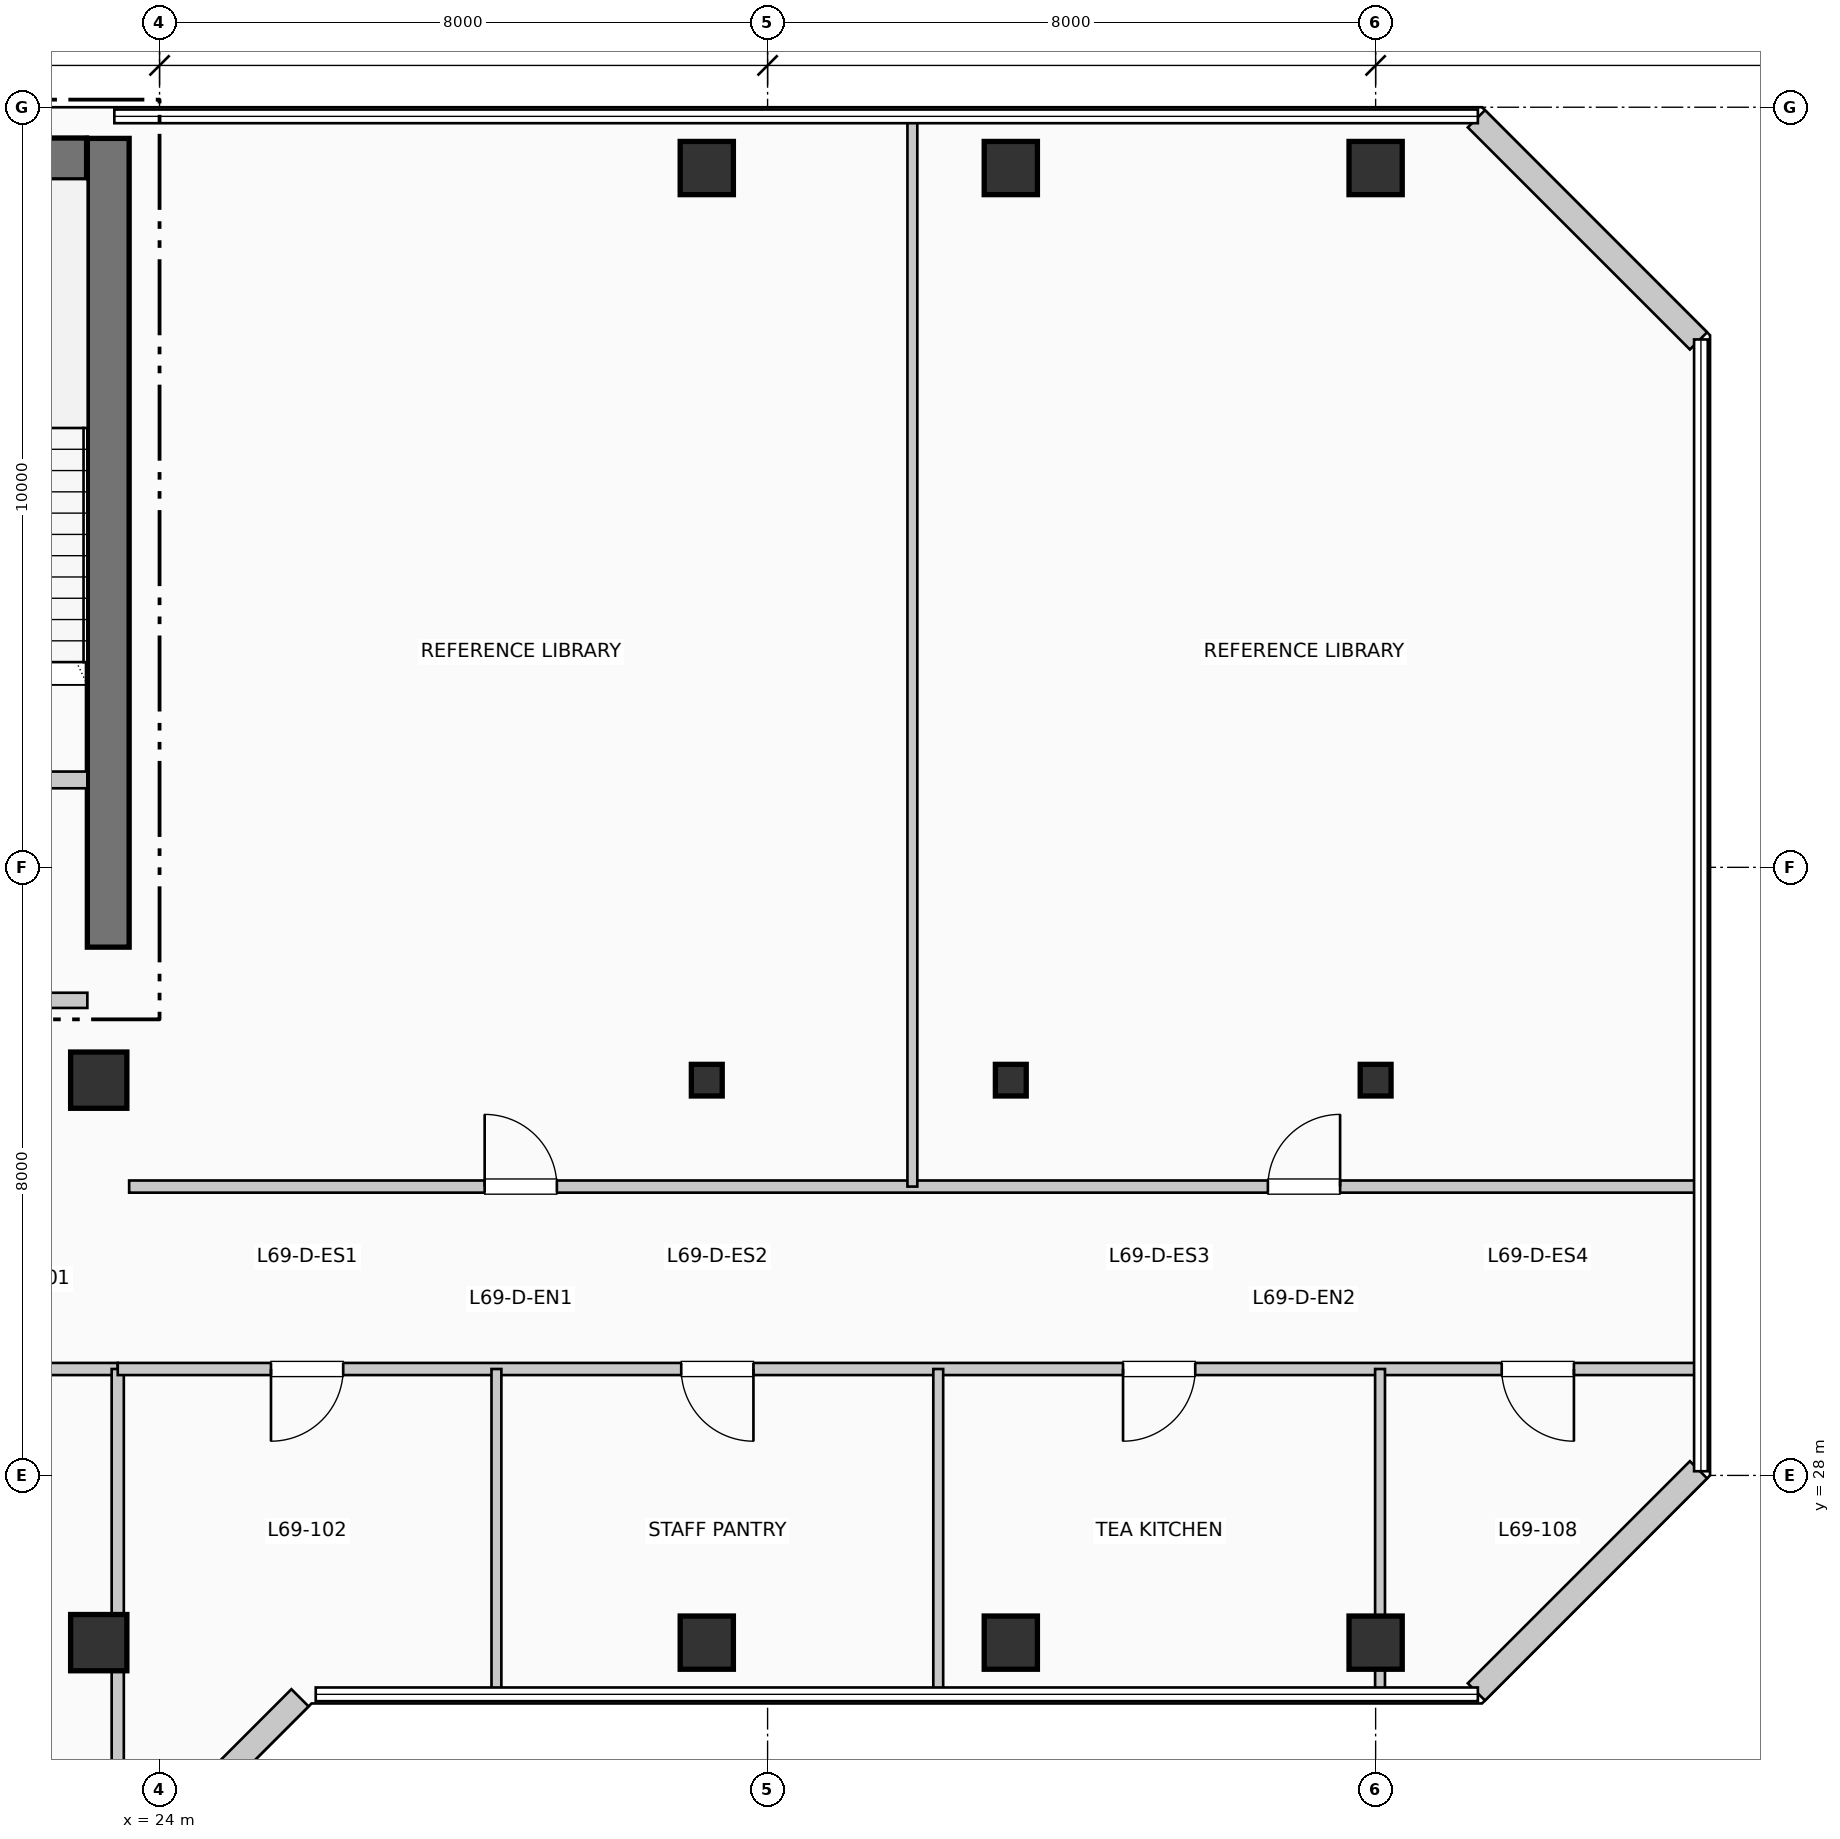
"""IFC4 building model, lengths in metres.
Left out: names, types, materials, properties, quantities, classifications, styles, units other than length and angle.
Written with IfcOpenShell. Run it as: python <this file> out.ifc"""

import sys

from ifc_helpers import new_model, si_unit, direction, frame, frame_2d, origin, origin_2d, place, context, subcontext, project, spatial, rectangle, i_section, extrude, element, fill, save


model = new_model("IFC4")
c1 = context("Model", 3, precision=1e-05, world=origin(), true_north=direction((0.0, 1.0)))
c2 = subcontext(c1, "Body", "Model", "MODEL_VIEW")
j1 = project(units=[si_unit("LENGTHUNIT", "METRE"), si_unit("PLANEANGLEUNIT", "RADIAN")], contexts=[c1])
p1 = place(None, origin())
s1 = spatial("IfcSite", under=j1, at=p1, CompositionType="ELEMENT")
p2 = place(p1, origin())
s2 = spatial("IfcBuilding", under=s1, at=p2, CompositionType="ELEMENT")
p3 = place(p2, frame((0.0, 0.0, 284.13)))
s3 = spatial("IfcBuildingStorey", under=s2, at=p3, CompositionType="ELEMENT", Elevation=284.13)
p4 = place(p3, frame((23.325, 34.95, 0.0), z_axis=(0.0, 0.0, 1.0), x_axis=(0.0, 1.0, 0.0)))
e1 = element("IfcWall", 1, at=p4, inside=s3, PredefinedType="SHEAR", context=c2, shape_type="SweptSolid", body=[
    extrude(rectangle(XDim=10.64, YDim=0.55, at=frame_2d((5.32, 0.0))), origin(), (0.0, 0.0, 1.0), 3.96),
])
p5 = place(p3, frame((19.35, 45.32, 0.0), z_axis=(0.0, 0.0, 1.0), x_axis=(1.0, 0.0, 0.0)))
e2 = element("IfcWall", 2, at=p5, inside=s3, PredefinedType="SHEAR", context=c2, shape_type="SweptSolid", body=[
    extrude(rectangle(XDim=3.69, YDim=0.55, at=frame_2d((1.845, 0.0))), origin(), (0.0, 0.0, 1.0), 3.96),
])
p6 = place(p5, frame((1.15, 0.0, 1.05)))
e3 = element("IfcOpeningElement", 3, at=p6, cuts=e2, PredefinedType="OPENING", context=c2, shape_type="SweptSolid", body=[
    extrude(rectangle(XDim=1.4, YDim=1.8, at=frame_2d((0.7, 0.9))), frame((0.0, 0.285, 0.0), z_axis=(0.0, -1.0, 0.0), x_axis=(1.0, 0.0, 0.0)), (0.0, 0.0, 1.0), 0.57),
])
for number, where, z_axis, x_axis in (
    (4, (23.2, 25.8, 0.0), (0.0, 0.0, 1.0), (1.0, 0.0, 0.0)),
    (5, (23.2, 33.2, 0.0), (0.0, 0.0, 1.0), (1.0, 0.0, 0.0)),
):
    element("IfcColumn", number, at=place(p3, frame(where, z_axis=z_axis, x_axis=x_axis)), inside=s3, PredefinedType="COLUMN", context=c2, shape_type="SweptSolid", body=[
        extrude(rectangle(XDim=0.74, YDim=0.74, at=origin_2d()), origin(), (0.0, 0.0, 1.0), 3.96),
    ])
p7 = place(p3, frame((31.2, 25.8, 0.0), z_axis=(0.0, 0.0, 1.0), x_axis=(1.0, 0.0, 0.0)))
e6 = element("IfcColumn", 6, at=p7, inside=s3, PredefinedType="COLUMN", context=c2, shape_type="SweptSolid", body=[
    extrude(rectangle(XDim=0.7, YDim=0.7, at=origin_2d()), origin(), (0.0, 0.0, 1.0), 3.96),
])
p8 = place(p3, frame((31.2, 33.2, 0.0), z_axis=(0.0, 0.0, 1.0), x_axis=(1.0, 0.0, 0.0)))
e7 = element("IfcColumn", 7, at=p8, inside=s3, PredefinedType="COLUMN", context=c2, shape_type="SweptSolid", body=[
    extrude(i_section(OverallWidth=0.406, OverallDepth=0.416, WebThickness=0.022, FlangeThickness=0.036, at=origin_2d()), origin(), (0.0, 0.0, 1.0), 3.96),
])
for number, where, z_axis, x_axis in (
    (8, (31.2, 45.2, 0.0), (0.0, 0.0, 1.0), (1.0, 0.0, 0.0)),
    (9, (35.2, 25.8, 0.0), (0.0, 0.0, 1.0), (1.0, 0.0, 0.0)),
):
    element("IfcColumn", number, at=place(p3, frame(where, z_axis=z_axis, x_axis=x_axis)), inside=s3, PredefinedType="COLUMN", context=c2, shape_type="SweptSolid", body=[
        extrude(rectangle(XDim=0.7, YDim=0.7, at=origin_2d()), origin(), (0.0, 0.0, 1.0), 3.96),
    ])
p9 = place(p3, frame((35.2, 33.2, 0.0), z_axis=(0.0, 0.0, 1.0), x_axis=(1.0, 0.0, 0.0)))
e10 = element("IfcColumn", 10, at=p9, inside=s3, PredefinedType="COLUMN", context=c2, shape_type="SweptSolid", body=[
    extrude(i_section(OverallWidth=0.406, OverallDepth=0.416, WebThickness=0.022, FlangeThickness=0.036, at=origin_2d()), origin(), (0.0, 0.0, 1.0), 3.96),
])
for number, where, z_axis, x_axis in (
    (11, (35.2, 45.2, 0.0), (0.0, 0.0, 1.0), (1.0, 0.0, 0.0)),
    (12, (40.0, 25.8, 0.0), (0.0, 0.0, 1.0), (1.0, 0.0, 0.0)),
):
    element("IfcColumn", number, at=place(p3, frame(where, z_axis=z_axis, x_axis=x_axis)), inside=s3, PredefinedType="COLUMN", context=c2, shape_type="SweptSolid", body=[
        extrude(rectangle(XDim=0.7, YDim=0.7, at=origin_2d()), origin(), (0.0, 0.0, 1.0), 3.96),
    ])
p10 = place(p3, frame((40.0, 33.2, 0.0), z_axis=(0.0, 0.0, 1.0), x_axis=(1.0, 0.0, 0.0)))
e13 = element("IfcColumn", 13, at=p10, inside=s3, PredefinedType="COLUMN", context=c2, shape_type="SweptSolid", body=[
    extrude(i_section(OverallWidth=0.406, OverallDepth=0.416, WebThickness=0.022, FlangeThickness=0.036, at=origin_2d()), origin(), (0.0, 0.0, 1.0), 3.96),
])
p11 = place(p3, frame((40.0, 45.2, 0.0), z_axis=(0.0, 0.0, 1.0), x_axis=(1.0, 0.0, 0.0)))
e14 = element("IfcColumn", 14, at=p11, inside=s3, PredefinedType="COLUMN", context=c2, shape_type="SweptSolid", body=[
    extrude(rectangle(XDim=0.7, YDim=0.7, at=origin_2d()), origin(), (0.0, 0.0, 1.0), 3.96),
])
p12 = place(p3, frame((23.926, 23.152, 0.0), z_axis=(0.0, 0.0, 1.0), x_axis=(0.707106781187, 0.707106781187, 0.0)))
e15 = element("IfcWall", 15, at=p12, inside=s3, PredefinedType="SOLIDWALL", context=c2, shape_type="SweptSolid", body=[
    extrude(rectangle(XDim=2.718, YDim=0.32, at=frame_2d((1.359, 0.0))), origin(), (0.0, 0.0, 1.0), 3.74),
])
for number, where, z_axis, x_axis in (
    (16, (41.326, 25.152, 0.0), (0.0, 0.0, 1.0), (0.707, 0.707, 0.0)),
    (17, (44.248, 42.926, 0.0), (0.0, 0.0, 1.0), (-0.707, 0.707, 0.0)),
):
    element("IfcWall", number, at=place(p3, frame(where, z_axis=z_axis, x_axis=x_axis)), inside=s3, PredefinedType="SOLIDWALL", context=c2, shape_type="SweptSolid", body=[
        extrude(rectangle(XDim=4.133, YDim=0.32, at=frame_2d((2.066, 0.0))), origin(), (0.0, 0.0, 1.0), 3.74),
    ])
p13 = place(p3, frame((19.9, 37.15, 0.0), z_axis=(0.0, 0.0, 1.0), x_axis=(1.0, 0.0, 0.0)))
e18 = element("IfcWall", 18, at=p13, inside=s3, PredefinedType="PARTITIONING", context=c2, shape_type="SweptSolid", body=[
    extrude(rectangle(XDim=3.15, YDim=0.22, at=frame_2d((1.575, 0.0))), origin(), (0.0, 0.0, 1.0), 3.74),
])
p14 = place(p13, frame((2.05, 0.0, 0.0), z_axis=(0.0, 0.0, 1.0), x_axis=(-1.0, 0.0, 0.0)))
e19 = element("IfcOpeningElement", 19, at=p14, cuts=e18, PredefinedType="OPENING", context=c2, shape_type="SweptSolid", body=[
    extrude(rectangle(XDim=1.05, YDim=2.15, at=frame_2d((0.525, 1.075))), frame((0.0, 0.12, 0.0), z_axis=(0.0, -1.0, 0.0), x_axis=(1.0, 0.0, 0.0)), (0.0, 0.0, 1.0), 0.24),
])
p15 = place(p3, frame((19.8, 34.25, 0.0), z_axis=(0.0, 0.0, 1.0), x_axis=(1.0, 0.0, 0.0)))
e20 = element("IfcWall", 20, at=p15, inside=s3, PredefinedType="PARTITIONING", context=c2, shape_type="SweptSolid", body=[
    extrude(rectangle(XDim=3.25, YDim=0.2, at=frame_2d((1.625, 0.0))), origin(), (0.0, 0.0, 1.0), 3.74),
])
p16 = place(p15, frame((2.15, 0.0, 0.0), z_axis=(0.0, 0.0, 1.0), x_axis=(-1.0, 0.0, 0.0)))
e21 = element("IfcOpeningElement", 21, at=p16, cuts=e20, PredefinedType="OPENING", context=c2, shape_type="SweptSolid", body=[
    extrude(rectangle(XDim=1.1, YDim=2.15, at=frame_2d((0.55, 1.075))), frame((0.0, 0.11, 0.0), z_axis=(0.0, -1.0, 0.0), x_axis=(1.0, 0.0, 0.0)), (0.0, 0.0, 1.0), 0.22),
])
p17 = place(p3, frame((7.14, 29.4, 0.0), z_axis=(0.0, 0.0, 1.0), x_axis=(1.0, 0.0, 0.0)))
e22 = element("IfcWall", 22, at=p17, inside=s3, PredefinedType="PARTITIONING", context=c2, shape_type="SweptSolid", body=[
    extrude(rectangle(XDim=16.31, YDim=0.16, at=frame_2d((8.155, 0.0))), origin(), (0.0, 0.0, 1.0), 3.425),
])
p18 = place(p3, frame((23.45, 5.99, 0.0), z_axis=(0.0, 0.0, 1.0), x_axis=(0.0, 1.0, 0.0)))
e23 = element("IfcWall", 23, at=p18, inside=s3, PredefinedType="PARTITIONING", context=c2, shape_type="SweptSolid", body=[
    extrude(rectangle(XDim=23.41, YDim=0.16, at=frame_2d((11.705, 0.0))), origin(), (0.0, 0.0, 1.0), 3.175),
])
p19 = place(p3, frame((23.45, 29.4, 0.0), z_axis=(0.0, 0.0, 1.0), x_axis=(1.0, 0.0, 0.0)))
e24 = element("IfcWall", 24, at=p19, inside=s3, PredefinedType="PARTITIONING", context=c2, shape_type="SweptSolid", body=[
    extrude(rectangle(XDim=20.76, YDim=0.16, at=frame_2d((10.38, 0.0))), origin(), (0.0, 0.0, 1.0), 3.425),
])
p20 = place(p19, frame((2.966, 0.0, 0.0), z_axis=(0.0, 0.0, 1.0), x_axis=(-1.0, 0.0, 0.0)))
e25 = element("IfcOpeningElement", 25, at=p20, cuts=e24, PredefinedType="OPENING", context=c2, shape_type="SweptSolid", body=[
    extrude(rectangle(XDim=0.95, YDim=2.15, at=frame_2d((0.475, 1.075))), frame((0.0, 0.09, 0.0), z_axis=(0.0, -1.0, 0.0), x_axis=(1.0, 0.0, 0.0)), (0.0, 0.0, 1.0), 0.18),
])
p21 = place(p19, frame((8.364, 0.0, 0.0), z_axis=(0.0, 0.0, 1.0), x_axis=(-1.0, 0.0, 0.0)))
e26 = element("IfcOpeningElement", 26, at=p21, cuts=e24, PredefinedType="OPENING", context=c2, shape_type="SweptSolid", body=[
    extrude(rectangle(XDim=0.95, YDim=2.15, at=frame_2d((0.475, 1.075))), frame((0.0, 0.09, 0.0), z_axis=(0.0, -1.0, 0.0), x_axis=(1.0, 0.0, 0.0)), (0.0, 0.0, 1.0), 0.18),
])
p22 = place(p19, frame((14.177, 0.0, 0.0), z_axis=(0.0, 0.0, 1.0), x_axis=(-1.0, 0.0, 0.0)))
e27 = element("IfcOpeningElement", 27, at=p22, cuts=e24, PredefinedType="OPENING", context=c2, shape_type="SweptSolid", body=[
    extrude(rectangle(XDim=0.95, YDim=2.15, at=frame_2d((0.475, 1.075))), frame((0.0, 0.09, 0.0), z_axis=(0.0, -1.0, 0.0), x_axis=(1.0, 0.0, 0.0)), (0.0, 0.0, 1.0), 0.18),
])
p23 = place(p19, frame((19.159, 0.0, 0.0), z_axis=(0.0, 0.0, 1.0), x_axis=(-1.0, 0.0, 0.0)))
e28 = element("IfcOpeningElement", 28, at=p23, cuts=e24, PredefinedType="OPENING", context=c2, shape_type="SweptSolid", body=[
    extrude(rectangle(XDim=0.95, YDim=2.15, at=frame_2d((0.475, 1.075))), frame((0.0, 0.09, 0.0), z_axis=(0.0, -1.0, 0.0), x_axis=(1.0, 0.0, 0.0)), (0.0, 0.0, 1.0), 0.18),
])
p24 = place(p3, frame((23.6, 31.8, 0.0), z_axis=(0.0, 0.0, 1.0), x_axis=(1.0, 0.0, 0.0)))
e29 = element("IfcWall", 29, at=p24, inside=s3, PredefinedType="PARTITIONING", context=c2, shape_type="SweptSolid", body=[
    extrude(rectangle(XDim=20.61, YDim=0.16, at=frame_2d((10.305, 0.0))), origin(), (0.0, 0.0, 1.0), 3.74),
])
p25 = place(p24, frame((4.677, 0.0, 0.0)))
e30 = element("IfcOpeningElement", 30, at=p25, cuts=e29, PredefinedType="OPENING", context=c2, shape_type="SweptSolid", body=[
    extrude(rectangle(XDim=0.95, YDim=2.15, at=frame_2d((0.475, 1.075))), frame((0.0, 0.09, 0.0), z_axis=(0.0, -1.0, 0.0), x_axis=(1.0, 0.0, 0.0)), (0.0, 0.0, 1.0), 0.18),
])
p26 = place(p24, frame((14.982, 0.0, 0.0)))
e31 = element("IfcOpeningElement", 31, at=p26, cuts=e29, PredefinedType="OPENING", context=c2, shape_type="SweptSolid", body=[
    extrude(rectangle(XDim=0.95, YDim=2.15, at=frame_2d((0.475, 1.075))), frame((0.0, 0.09, 0.0), z_axis=(0.0, -1.0, 0.0), x_axis=(1.0, 0.0, 0.0)), (0.0, 0.0, 1.0), 0.18),
])
for number, where, z_axis, x_axis in (
    (32, (28.432, 25.19, 0.0), (0.0, 0.0, 1.0), (0.0, 1.0, 0.0)),
    (33, (34.245, 25.19, 0.0), (0.0, 0.0, 1.0), (0.0, 1.0, 0.0)),
):
    element("IfcWall", number, at=place(p3, frame(where, z_axis=z_axis, x_axis=x_axis)), inside=s3, PredefinedType="PARTITIONING", context=c2, shape_type="SweptSolid", body=[
        extrude(rectangle(XDim=4.21, YDim=0.13, at=frame_2d((2.105, 0.0))), origin(), (0.0, 0.0, 1.0), 3.74),
    ])
p27 = place(p3, frame((40.058, 25.19, 0.0), z_axis=(0.0, 0.0, 1.0), x_axis=(0.0, 1.0, 0.0)))
e34 = element("IfcWall", 34, at=p27, inside=s3, PredefinedType="PARTITIONING", context=c2, shape_type="SweptSolid", body=[
    extrude(rectangle(XDim=4.21, YDim=0.13, at=frame_2d((2.105, 0.0))), origin(), (0.0, 0.0, 1.0), 3.175),
])
p28 = place(p3, frame((33.905, 31.8, 0.0), z_axis=(0.0, 0.0, 1.0), x_axis=(0.0, 1.0, 0.0)))
e35 = element("IfcWall", 35, at=p28, inside=s3, PredefinedType="PARTITIONING", context=c2, shape_type="SweptSolid", body=[
    extrude(rectangle(XDim=14.01, YDim=0.13, at=frame_2d((7.005, 0.0))), origin(), (0.0, 0.0, 1.0), 3.74),
])
p29 = place(p20, origin())
e36 = element("IfcDoor", 36, at=p29, inside=s3, OperationType="SINGLE_SWING_LEFT", PredefinedType="DOOR", context=c2, shape_type="SweptSolid", body=[
    extrude(rectangle(XDim=0.95, YDim=2.15, at=frame_2d((0.475, 1.075))), frame((0.0, 0.025, 0.0), z_axis=(0.0, -1.0, 0.0), x_axis=(1.0, 0.0, 0.0)), (0.0, 0.0, 1.0), 0.05),
])
fill(e25, e36)
p30 = place(p21, origin())
e37 = element("IfcDoor", 37, at=p30, inside=s3, OperationType="SINGLE_SWING_RIGHT", PredefinedType="DOOR", context=c2, shape_type="SweptSolid", body=[
    extrude(rectangle(XDim=0.95, YDim=2.15, at=frame_2d((0.475, 1.075))), frame((0.0, 0.025, 0.0), z_axis=(0.0, -1.0, 0.0), x_axis=(1.0, 0.0, 0.0)), (0.0, 0.0, 1.0), 0.05),
])
fill(e26, e37)
p31 = place(p22, origin())
e38 = element("IfcDoor", 38, at=p31, inside=s3, OperationType="SINGLE_SWING_LEFT", PredefinedType="DOOR", context=c2, shape_type="SweptSolid", body=[
    extrude(rectangle(XDim=0.95, YDim=2.15, at=frame_2d((0.475, 1.075))), frame((0.0, 0.025, 0.0), z_axis=(0.0, -1.0, 0.0), x_axis=(1.0, 0.0, 0.0)), (0.0, 0.0, 1.0), 0.05),
])
fill(e27, e38)
p32 = place(p23, origin())
e39 = element("IfcDoor", 39, at=p32, inside=s3, OperationType="SINGLE_SWING_RIGHT", PredefinedType="DOOR", context=c2, shape_type="SweptSolid", body=[
    extrude(rectangle(XDim=0.95, YDim=2.15, at=frame_2d((0.475, 1.075))), frame((0.0, 0.025, 0.0), z_axis=(0.0, -1.0, 0.0), x_axis=(1.0, 0.0, 0.0)), (0.0, 0.0, 1.0), 0.05),
])
fill(e28, e39)
p33 = place(p25, origin())
e40 = element("IfcDoor", 40, at=p33, inside=s3, OperationType="SINGLE_SWING_LEFT", PredefinedType="DOOR", context=c2, shape_type="SweptSolid", body=[
    extrude(rectangle(XDim=0.95, YDim=2.15, at=frame_2d((0.475, 1.075))), frame((0.0, 0.025, 0.0), z_axis=(0.0, -1.0, 0.0), x_axis=(1.0, 0.0, 0.0)), (0.0, 0.0, 1.0), 0.05),
])
fill(e30, e40)
p34 = place(p26, origin())
e41 = element("IfcDoor", 41, at=p34, inside=s3, OperationType="SINGLE_SWING_RIGHT", PredefinedType="DOOR", context=c2, shape_type="SweptSolid", body=[
    extrude(rectangle(XDim=0.95, YDim=2.15, at=frame_2d((0.475, 1.075))), frame((0.0, 0.025, 0.0), z_axis=(0.0, -1.0, 0.0), x_axis=(1.0, 0.0, 0.0)), (0.0, 0.0, 1.0), 0.05),
])
fill(e31, e41)
save(model, sys.argv[1])
